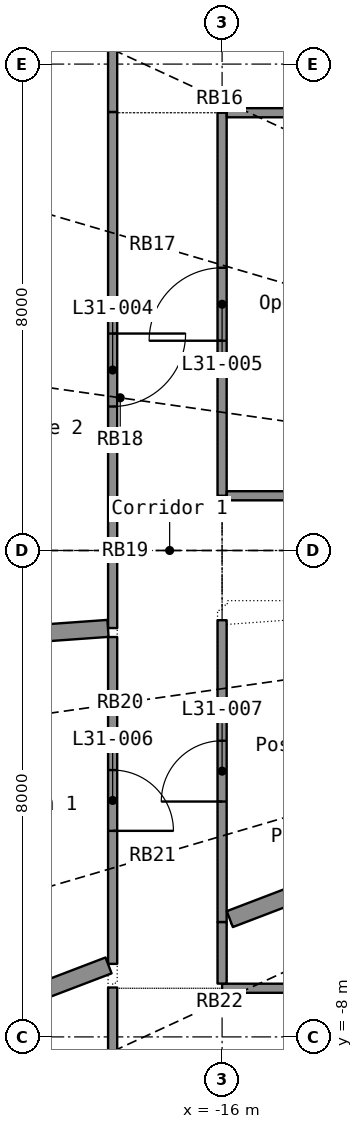
"""IFC4 building model, lengths in metres.
Left out: names, types, materials, properties, quantities, classifications, styles, units other than length and angle.
Written with IfcOpenShell. Run it as: python <this file> out.ifc"""

import sys

from ifc_helpers import new_model, si_unit, direction, frame, frame_2d, origin, place, context, subcontext, project, spatial, rectangle, extrude, element, fill, save


model = new_model("IFC4")
c1 = context("Model", 3, precision=1e-05, world=origin(), true_north=direction((0.0, 1.0)))
c2 = subcontext(c1, "Body", "Model", "MODEL_VIEW")
j1 = project(units=[si_unit("LENGTHUNIT", "METRE"), si_unit("PLANEANGLEUNIT", "RADIAN")], contexts=[c1])
p1 = place(None, origin())
s1 = spatial("IfcSite", under=j1, at=p1, CompositionType="ELEMENT")
p2 = place(p1, origin())
s2 = spatial("IfcBuilding", under=s1, at=p2, CompositionType="ELEMENT")
p3 = place(p2, frame((0.0, 0.0, 130.4)))
s3 = spatial("IfcBuildingStorey", under=s2, at=p3, CompositionType="ELEMENT", Elevation=130.4)
p4 = place(p3, frame((-17.8, 7.212, 0.0), z_axis=(0.0, 0.0, 1.0), x_axis=(0.0, -1.0, 0.0)))
e1 = element("IfcWall", 1, at=p4, inside=s3, PredefinedType="PARTITIONING", context=c2, shape_type="SweptSolid", body=[
    extrude(rectangle(XDim=8.488, YDim=0.15, at=frame_2d((4.244, 0.0))), origin(), (0.0, 0.0, 1.0), 2.4),
])
p5 = place(p4, frame((3.644, 0.0, 0.0)))
e2 = element("IfcOpeningElement", 2, at=p5, cuts=e1, PredefinedType="OPENING", context=c2, shape_type="SweptSolid", body=[
    extrude(rectangle(XDim=1.2, YDim=2.2, at=frame_2d((0.6, 1.1))), frame((0.0, 0.085, 0.0), z_axis=(0.0, -1.0, 0.0), x_axis=(1.0, 0.0, 0.0)), (0.0, 0.0, 1.0), 0.17),
])
p6 = place(p3, frame((-24.622, -1.764, 0.0), z_axis=(0.0, 0.0, 1.0), x_axis=(0.997442181, 0.071477941, 0.0)))
e3 = element("IfcWall", 3, at=p6, inside=s3, PredefinedType="PARTITIONING", context=c2, shape_type="SweptSolid", body=[
    extrude(rectangle(XDim=6.763, YDim=0.28, at=frame_2d((3.381, 0.0))), origin(), (0.0, 0.0, 1.0), 2.4),
])
p7 = place(p6, frame((2.632, 0.0, 1.0)))
e4 = element("IfcOpeningElement", 4, at=p7, cuts=e3, PredefinedType="OPENING", context=c2, shape_type="SweptSolid", body=[
    extrude(rectangle(XDim=1.5, YDim=1.2, at=frame_2d((0.75, 0.6))), frame((0.0, 0.15, 0.0), z_axis=(0.0, -1.0, 0.0), x_axis=(1.0, 0.0, 0.0)), (0.0, 0.0, 1.0), 0.3),
])
p8 = place(p3, frame((-16.0, 0.9, 0.0), z_axis=(0.0, 0.0, 1.0), x_axis=(0.0, 1.0, 0.0)))
e5 = element("IfcWall", 5, at=p8, inside=s3, PredefinedType="PARTITIONING", context=c2, shape_type="SweptSolid", body=[
    extrude(rectangle(XDim=6.3, YDim=0.15, at=frame_2d((3.15, 0.0))), origin(), (0.0, 0.0, 1.0), 2.4),
])
p9 = place(p8, frame((2.55, 0.0, 0.0)))
e6 = element("IfcOpeningElement", 6, at=p9, cuts=e5, PredefinedType="OPENING", context=c2, shape_type="SweptSolid", body=[
    extrude(rectangle(XDim=1.2, YDim=2.2, at=frame_2d((0.6, 1.1))), frame((0.0, 0.085, 0.0), z_axis=(0.0, -1.0, 0.0), x_axis=(1.0, 0.0, 0.0)), (0.0, 0.0, 1.0), 0.17),
])
p10 = place(p3, frame((-17.8, -1.423, 0.0), z_axis=(0.0, 0.0, 1.0), x_axis=(0.0, -1.0, 0.0)))
e7 = element("IfcWall", 7, at=p10, inside=s3, PredefinedType="PARTITIONING", context=c2, shape_type="SweptSolid", body=[
    extrude(rectangle(XDim=5.375, YDim=0.15, at=frame_2d((2.688, 0.0))), origin(), (0.0, 0.0, 1.0), 2.4),
])
p11 = place(p10, frame((2.188, 0.0, 0.0)))
e8 = element("IfcOpeningElement", 8, at=p11, cuts=e7, PredefinedType="OPENING", context=c2, shape_type="SweptSolid", body=[
    extrude(rectangle(XDim=1.0, YDim=2.2, at=frame_2d((0.5, 1.1))), frame((0.0, 0.085, 0.0), z_axis=(0.0, -1.0, 0.0), x_axis=(1.0, 0.0, 0.0)), (0.0, 0.0, 1.0), 0.17),
])
p12 = place(p3, frame((-16.0, -6.111, 0.0), z_axis=(0.0, 0.0, 1.0), x_axis=(0.0, 1.0, 0.0)))
e9 = element("IfcWall", 9, at=p12, inside=s3, PredefinedType="PARTITIONING", context=c2, shape_type="SweptSolid", body=[
    extrude(rectangle(XDim=4.965, YDim=0.15, at=frame_2d((2.482, 0.0))), origin(), (0.0, 0.0, 1.0), 2.4),
])
p13 = place(p12, frame((1.982, 0.0, 0.0)))
e10 = element("IfcOpeningElement", 10, at=p13, cuts=e9, PredefinedType="OPENING", context=c2, shape_type="SweptSolid", body=[
    extrude(rectangle(XDim=1.0, YDim=2.2, at=frame_2d((0.5, 1.1))), frame((0.0, 0.085, 0.0), z_axis=(0.0, -1.0, 0.0), x_axis=(1.0, 0.0, 0.0)), (0.0, 0.0, 1.0), 0.17),
])
p14 = place(p3, frame((-22.396, -8.554, 0.0), z_axis=(0.0, 0.0, 1.0), x_axis=(0.934184204, 0.356791077, 0.0)))
e11 = element("IfcWall", 11, at=p14, inside=s3, PredefinedType="PARTITIONING", context=c2, shape_type="SweptSolid", body=[
    extrude(rectangle(XDim=4.847, YDim=0.28, at=frame_2d((2.424, 0.0))), origin(), (0.0, 0.0, 1.0), 2.4),
])
p15 = place(p3, frame((-15.873, -6.063, 0.0), z_axis=(0.0, 0.0, 1.0), x_axis=(0.934170215, 0.356827703, 0.0)))
e12 = element("IfcWall", 12, at=p15, inside=s3, PredefinedType="PARTITIONING", context=c2, shape_type="SweptSolid", body=[
    extrude(rectangle(XDim=4.146, YDim=0.28, at=frame_2d((2.073, 0.0))), origin(), (0.0, 0.0, 1.0), 2.4),
])
p16 = place(p15, frame((1.323, 0.0, 1.0)))
e13 = element("IfcOpeningElement", 13, at=p16, cuts=e12, PredefinedType="OPENING", context=c2, shape_type="SweptSolid", body=[
    extrude(rectangle(XDim=1.5, YDim=1.2, at=frame_2d((0.75, 0.6))), frame((0.0, 0.15, 0.0), z_axis=(0.0, -1.0, 0.0), x_axis=(1.0, 0.0, 0.0)), (0.0, 0.0, 1.0), 0.3),
])
p17 = place(p3, frame((-15.923, 7.2, 0.0), z_axis=(0.0, 0.0, 1.0), x_axis=(1.0, 0.0, 0.0)))
e14 = element("IfcWall", 14, at=p17, inside=s3, PredefinedType="PARTITIONING", context=c2, shape_type="SweptSolid", body=[
    extrude(rectangle(XDim=3.923, YDim=0.15, at=frame_2d((1.961, 0.0))), origin(), (0.0, 0.0, 1.0), 2.4),
])
p18 = place(p3, frame((-12.0, -7.2, 0.0), z_axis=(0.0, 0.0, 1.0), x_axis=(-1.0, 0.0, 0.0)))
e15 = element("IfcWall", 15, at=p18, inside=s3, PredefinedType="PARTITIONING", context=c2, shape_type="SweptSolid", body=[
    extrude(rectangle(XDim=4.0, YDim=0.15, at=frame_2d((2.0, 0.0))), origin(), (0.0, 0.0, 1.0), 2.4),
])
p19 = place(p18, frame((1.5, 0.0, 0.0)))
e16 = element("IfcOpeningElement", 16, at=p19, cuts=e15, PredefinedType="OPENING", context=c2, shape_type="SweptSolid", body=[
    extrude(rectangle(XDim=1.0, YDim=2.2, at=frame_2d((0.5, 1.1))), frame((0.0, 0.085, 0.0), z_axis=(0.0, -1.0, 0.0), x_axis=(1.0, 0.0, 0.0)), (0.0, 0.0, 1.0), 0.17),
])
p20 = place(p3, frame((-12.0, 0.9, 0.0), z_axis=(0.0, 0.0, 1.0), x_axis=(-1.0, 0.0, 0.0)))
e17 = element("IfcWall", 17, at=p20, inside=s3, PredefinedType="PARTITIONING", context=c2, shape_type="SweptSolid", body=[
    extrude(rectangle(XDim=3.923, YDim=0.15, at=frame_2d((1.961, 0.0))), origin(), (0.0, 0.0, 1.0), 2.4),
])
p21 = place(p3, frame((-17.8, -7.188, 0.0), z_axis=(0.0, 0.0, 1.0), x_axis=(0.0, -1.0, 0.0)))
e18 = element("IfcWall", 18, at=p21, inside=s3, PredefinedType="PARTITIONING", context=c2, shape_type="SweptSolid", body=[
    extrude(rectangle(XDim=3.535, YDim=0.15, at=frame_2d((1.768, 0.0))), origin(), (0.0, 0.0, 1.0), 2.4),
])
p22 = place(p3, frame((-17.8, 10.723, 0.0), z_axis=(0.0, 0.0, 1.0), x_axis=(0.0, -1.0, 0.0)))
e19 = element("IfcWall", 19, at=p22, inside=s3, PredefinedType="PARTITIONING", context=c2, shape_type="SweptSolid", body=[
    extrude(rectangle(XDim=3.51, YDim=0.15, at=frame_2d((1.755, 0.0))), origin(), (0.0, 0.0, 1.0), 2.4),
])
p23 = place(p3, frame((-16.0, -7.123, 0.0), z_axis=(0.0, 0.0, 1.0), x_axis=(0.0, 1.0, 0.0)))
e20 = element("IfcWall", 20, at=p23, inside=s3, PredefinedType="PARTITIONING", context=c2, shape_type="SweptSolid", body=[
    extrude(rectangle(XDim=1.011, YDim=0.15, at=frame_2d((0.505, 0.0))), origin(), (0.0, 0.0, 1.0), 2.4),
])
p24 = place(p5, origin())
e21 = element("IfcDoor", 21, at=p24, inside=s3, OperationType="DOUBLE_DOOR_SINGLE_SWING", PredefinedType="DOOR", context=c2, shape_type="SweptSolid", body=[
    extrude(rectangle(XDim=1.2, YDim=2.2, at=frame_2d((0.6, 1.1))), frame((0.0, 0.025, 0.0), z_axis=(0.0, -1.0, 0.0), x_axis=(1.0, 0.0, 0.0)), (0.0, 0.0, 1.0), 0.05),
])
fill(e2, e21)
p25 = place(p9, origin())
e22 = element("IfcDoor", 22, at=p25, inside=s3, OperationType="DOUBLE_DOOR_SINGLE_SWING", PredefinedType="DOOR", context=c2, shape_type="SweptSolid", body=[
    extrude(rectangle(XDim=1.2, YDim=2.2, at=frame_2d((0.6, 1.1))), frame((0.0, 0.025, 0.0), z_axis=(0.0, -1.0, 0.0), x_axis=(1.0, 0.0, 0.0)), (0.0, 0.0, 1.0), 0.05),
])
fill(e6, e22)
p26 = place(p11, origin())
e23 = element("IfcDoor", 23, at=p26, inside=s3, OperationType="SINGLE_SWING_RIGHT", PredefinedType="DOOR", context=c2, shape_type="SweptSolid", body=[
    extrude(rectangle(XDim=1.0, YDim=2.2, at=frame_2d((0.5, 1.1))), frame((0.0, 0.025, 0.0), z_axis=(0.0, -1.0, 0.0), x_axis=(1.0, 0.0, 0.0)), (0.0, 0.0, 1.0), 0.05),
])
fill(e8, e23)
p27 = place(p13, origin())
e24 = element("IfcDoor", 24, at=p27, inside=s3, OperationType="SINGLE_SWING_LEFT", PredefinedType="DOOR", context=c2, shape_type="SweptSolid", body=[
    extrude(rectangle(XDim=1.0, YDim=2.2, at=frame_2d((0.5, 1.1))), frame((0.0, 0.025, 0.0), z_axis=(0.0, -1.0, 0.0), x_axis=(1.0, 0.0, 0.0)), (0.0, 0.0, 1.0), 0.05),
])
fill(e10, e24)
save(model, sys.argv[1])
